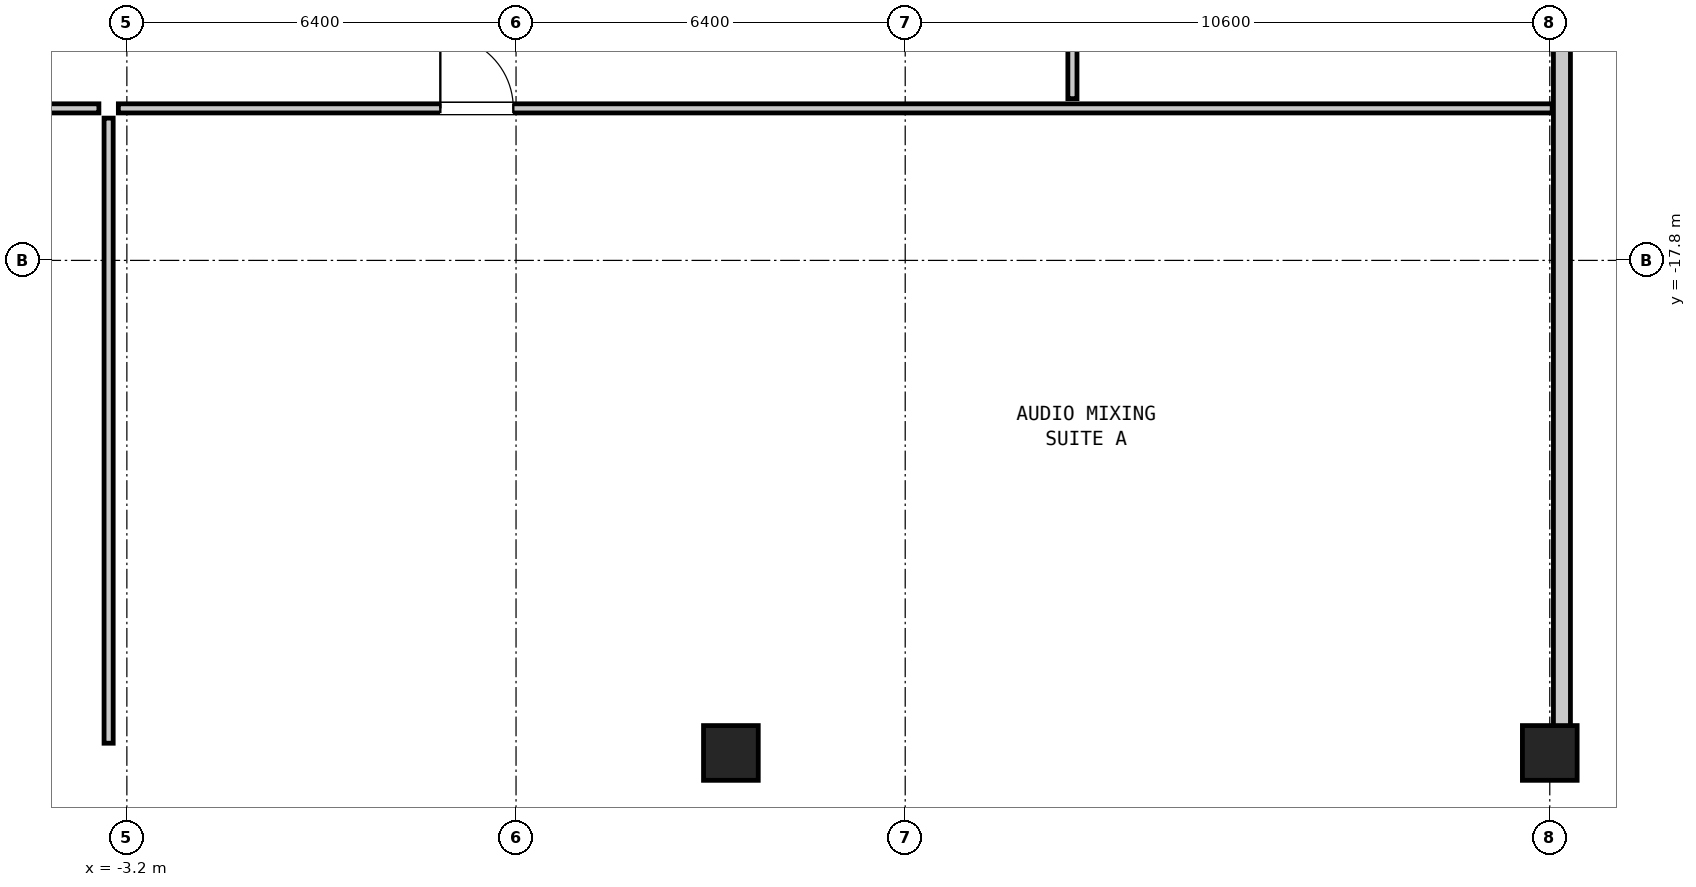
"""IFC4 building model, lengths in metres.
Left out: names, types, materials, properties, quantities, classifications, styles, units other than length and angle.
Written with IfcOpenShell. Run it as: python <this file> out.ifc"""

import sys

from ifc_helpers import new_model, si_unit, direction, frame, frame_2d, origin, origin_2d, place, context, subcontext, project, spatial, rectangle, hollow_rectangle, extrude, element, fill, save


model = new_model("IFC4")
c1 = context("Model", 3, precision=1e-05, world=origin(), true_north=direction((0.0, 1.0)))
c2 = subcontext(c1, "Body", "Model", "MODEL_VIEW")
j1 = project(units=[si_unit("LENGTHUNIT", "METRE"), si_unit("PLANEANGLEUNIT", "RADIAN")], contexts=[c1])
p1 = place(None, origin())
s1 = spatial("IfcSite", under=j1, at=p1, CompositionType="ELEMENT")
p2 = place(p1, origin())
s2 = spatial("IfcBuilding", under=s1, at=p2, CompositionType="ELEMENT")
p3 = place(p2, frame((0.0, 0.0, 5.1)))
s3 = spatial("IfcBuildingStorey", under=s2, at=p3, CompositionType="ELEMENT", Elevation=5.1)
for number, where, z_axis, x_axis in (
    (1, (6.733, -25.9, 0.0), (0.0, 0.0, 1.0), (1.0, 0.0, 0.0)),
    (2, (20.2, -25.9, 0.0), (0.0, 0.0, 1.0), (1.0, 0.0, 0.0)),
):
    element("IfcColumn", number, at=place(p3, frame(where, z_axis=z_axis, x_axis=x_axis)), inside=s3, PredefinedType="COLUMN", context=c2, shape_type="SweptSolid", body=[
        extrude(hollow_rectangle(XDim=0.9, YDim=0.9, WallThickness=0.055, at=origin_2d()), origin(), (0.0, 0.0, 1.0), 4.2),
    ])
p4 = place(p3, frame((20.4, -25.74, 0.0), z_axis=(0.0, 0.0, 1.0), x_axis=(0.0, 1.0, 0.0)))
e3 = element("IfcWall", 3, at=p4, inside=s3, PredefinedType="MOVABLE", context=c2, shape_type="SweptSolid", body=[
    extrude(rectangle(XDim=51.48, YDim=0.28, at=frame_2d((25.74, 0.0))), origin(), (0.0, 0.0, 1.0), 2.933),
])
p5 = place(p4, frame((25.255, 0.0, 0.0)))
e4 = element("IfcOpeningElement", 4, at=p5, cuts=e3, PredefinedType="OPENING", context=c2, shape_type="SweptSolid", body=[
    extrude(rectangle(XDim=2.0, YDim=2.14, at=frame_2d((1.0, 1.07))), frame((0.0, 0.152, 0.0), z_axis=(0.0, -1.0, 0.0), x_axis=(1.0, 0.0, 0.0)), (0.0, 0.0, 1.0), 0.304),
])
p6 = place(p3, frame((-28.24, -15.3, 0.0), z_axis=(0.0, 0.0, 1.0), x_axis=(1.0, 0.0, 0.0)))
e5 = element("IfcWall", 5, at=p6, inside=s3, PredefinedType="PARTITIONING", context=c2, shape_type="SweptSolid", body=[
    extrude(rectangle(XDim=24.58, YDim=0.15, at=frame_2d((12.29, 0.0))), origin(), (0.0, 0.0, 1.0), 3.88),
])
p7 = place(p6, frame((18.572, 0.0, 0.0)))
e6 = element("IfcOpeningElement", 6, at=p7, cuts=e5, PredefinedType="OPENING", context=c2, shape_type="SweptSolid", body=[
    extrude(rectangle(XDim=1.2, YDim=2.1, at=frame_2d((0.6, 1.05))), frame((0.0, 0.087, 0.0), z_axis=(0.0, -1.0, 0.0), x_axis=(1.0, 0.0, 0.0)), (0.0, 0.0, 1.0), 0.174),
])
p8 = place(p3, frame((-3.34, -15.3, 0.0), z_axis=(0.0, 0.0, 1.0), x_axis=(1.0, 0.0, 0.0)))
e7 = element("IfcWall", 7, at=p8, inside=s3, PredefinedType="PARTITIONING", context=c2, shape_type="SweptSolid", body=[
    extrude(rectangle(XDim=23.58, YDim=0.15, at=frame_2d((11.79, 0.0))), origin(), (0.0, 0.0, 1.0), 3.88),
])
p9 = place(p8, frame((5.295, 0.0, 0.0)))
e8 = element("IfcOpeningElement", 8, at=p9, cuts=e7, PredefinedType="OPENING", context=c2, shape_type="SweptSolid", body=[
    extrude(rectangle(XDim=1.2, YDim=2.1, at=frame_2d((0.6, 1.05))), frame((0.0, 0.087, 0.0), z_axis=(0.0, -1.0, 0.0), x_axis=(1.0, 0.0, 0.0)), (0.0, 0.0, 1.0), 0.174),
])
p10 = place(p3, frame((-3.5, -25.74, 0.0), z_axis=(0.0, 0.0, 1.0), x_axis=(0.0, 1.0, 0.0)))
e9 = element("IfcWall", 9, at=p10, inside=s3, PredefinedType="PARTITIONING", context=c2, shape_type="SweptSolid", body=[
    extrude(rectangle(XDim=10.28, YDim=0.15, at=frame_2d((5.14, 0.0))), origin(), (0.0, 0.0, 1.0), 3.88),
])
p11 = place(p3, frame((12.35, -15.14, 0.0), z_axis=(0.0, 0.0, 1.0), x_axis=(0.0, 1.0, 0.0)))
e10 = element("IfcWall", 10, at=p11, inside=s3, PredefinedType="PARTITIONING", context=c2, shape_type="SweptSolid", body=[
    extrude(rectangle(XDim=12.6, YDim=0.15, at=frame_2d((6.3, 0.0))), origin(), (0.0, 0.0, 1.0), 3.88),
])
p12 = place(p11, frame((5.825, 0.0, 0.0)))
e11 = element("IfcOpeningElement", 11, at=p12, cuts=e10, PredefinedType="OPENING", context=c2, shape_type="SweptSolid", body=[
    extrude(rectangle(XDim=0.95, YDim=2.1, at=frame_2d((0.475, 1.05))), frame((0.0, 0.087, 0.0), z_axis=(0.0, -1.0, 0.0), x_axis=(1.0, 0.0, 0.0)), (0.0, 0.0, 1.0), 0.174),
])
p13 = place(p9, origin())
e12 = element("IfcDoor", 12, at=p13, inside=s3, OperationType="SINGLE_SWING_LEFT", PredefinedType="DOOR", context=c2, shape_type="SweptSolid", body=[
    extrude(rectangle(XDim=1.2, YDim=2.1, at=frame_2d((0.6, 1.05))), frame((0.0, 0.025, 0.0), z_axis=(0.0, -1.0, 0.0), x_axis=(1.0, 0.0, 0.0)), (0.0, 0.0, 1.0), 0.05),
])
fill(e8, e12)
save(model, sys.argv[1])
